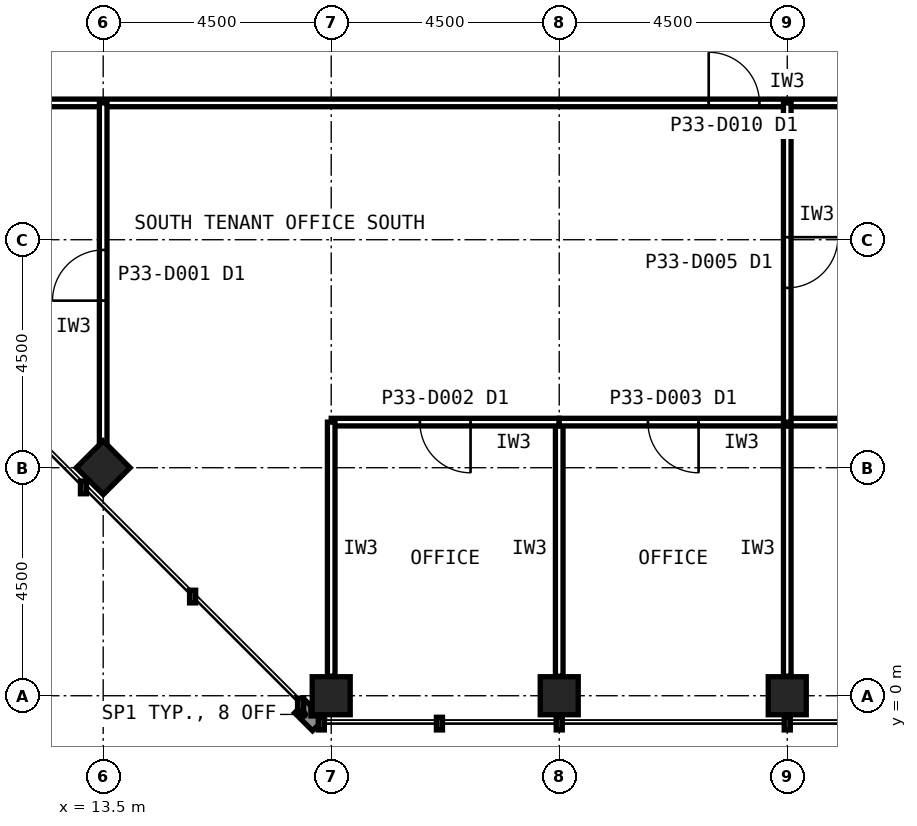
"""IFC4 building model, lengths in metres.
Left out: names, types, materials, properties, quantities, classifications, styles, units other than length and angle.
Written with IfcOpenShell. Run it as: python <this file> out.ifc"""

import sys

from ifc_helpers import new_model, si_unit, direction, frame, frame_2d, origin, origin_2d, place, context, subcontext, project, spatial, rectangle, hollow_rectangle, extrude, element, fill, save


model = new_model("IFC4")
c1 = context("Model", 3, precision=1e-05, world=origin(), true_north=direction((0.0, 1.0)))
c2 = subcontext(c1, "Body", "Model", "MODEL_VIEW")
j1 = project(units=[si_unit("LENGTHUNIT", "METRE"), si_unit("PLANEANGLEUNIT", "RADIAN")], contexts=[c1])
p1 = place(None, origin())
s1 = spatial("IfcSite", under=j1, at=p1, CompositionType="ELEMENT")
p2 = place(p1, origin())
s2 = spatial("IfcBuilding", under=s1, at=p2, CompositionType="ELEMENT")
p3 = place(p2, frame((0.0, 0.0, 143.6)))
s3 = spatial("IfcBuildingStorey", under=s2, at=p3, CompositionType="ELEMENT", Elevation=143.6)
for number, where, z_axis, x_axis in (
    (1, (18.0, 0.0, 0.0), (0.0, 0.0, 1.0), (1.0, 0.0, 0.0)),
    (2, (22.5, 0.0, 0.0), (0.0, 0.0, 1.0), (1.0, 0.0, 0.0)),
    (3, (27.0, 0.0, 0.0), (0.0, 0.0, 1.0), (1.0, 0.0, 0.0)),
    (4, (13.5, 4.5, 0.0), (0.0, 0.0, 1.0), (0.707, 0.707, 0.0)),
):
    element("IfcColumn", number, at=place(p3, frame(where, z_axis=z_axis, x_axis=x_axis)), inside=s3, PredefinedType="COLUMN", context=c2, shape_type="SweptSolid", body=[
        extrude(hollow_rectangle(XDim=0.75, YDim=0.75, WallThickness=0.04, at=origin_2d()), origin(), (0.0, 0.0, 1.0), 4.0),
    ])
p4 = place(p3, frame((11.7, 11.7, 0.0), z_axis=(0.0, 0.0, 1.0), x_axis=(1.0, 0.0, 0.0)))
e5 = element("IfcWall", 5, at=p4, inside=s3, PredefinedType="PARTITIONING", context=c2, shape_type="SweptSolid", body=[
    extrude(rectangle(XDim=30.6, YDim=0.15, at=frame_2d((15.3, 0.0))), origin(), (0.0, 0.0, 1.0), 3.84),
])
p5 = place(p4, frame((13.75, 0.0, 0.0)))
e6 = element("IfcOpeningElement", 6, at=p5, cuts=e5, PredefinedType="OPENING", context=c2, shape_type="SweptSolid", body=[
    extrude(rectangle(XDim=1.0, YDim=2.1, at=frame_2d((0.5, 1.05))), frame((0.0, 0.085, 0.0), z_axis=(0.0, -1.0, 0.0), x_axis=(1.0, 0.0, 0.0)), (0.0, 0.0, 1.0), 0.17),
])
p6 = place(p3, frame((22.5, 0.385, 0.0), z_axis=(0.0, 0.0, 1.0), x_axis=(0.0, 1.0, 0.0)))
e7 = element("IfcWall", 7, at=p6, inside=s3, PredefinedType="PARTITIONING", context=c2, shape_type="SweptSolid", body=[
    extrude(rectangle(XDim=5.015, YDim=0.15, at=frame_2d((2.507, 0.0))), origin(), (0.0, 0.0, 1.0), 2.989),
])
p7 = place(p3, frame((22.5, 5.4, 0.0), z_axis=(0.0, 0.0, 1.0), x_axis=(-1.0, 0.0, 0.0)))
e8 = element("IfcWall", 8, at=p7, inside=s3, PredefinedType="PARTITIONING", context=c2, shape_type="SweptSolid", body=[
    extrude(rectangle(XDim=4.5, YDim=0.15, at=frame_2d((2.25, 0.0))), origin(), (0.0, 0.0, 1.0), 3.84),
])
p8 = place(p7, frame((1.75, 0.0, 0.0)))
e9 = element("IfcOpeningElement", 9, at=p8, cuts=e8, PredefinedType="OPENING", context=c2, shape_type="SweptSolid", body=[
    extrude(rectangle(XDim=1.0, YDim=2.1, at=frame_2d((0.5, 1.05))), frame((0.0, 0.085, 0.0), z_axis=(0.0, -1.0, 0.0), x_axis=(1.0, 0.0, 0.0)), (0.0, 0.0, 1.0), 0.17),
])
for number, where, z_axis, x_axis in (
    (10, (18.0, 5.4, 0.0), (0.0, 0.0, 1.0), (0.0, -1.0, 0.0)),
    (11, (27.0, 0.385, 0.0), (0.0, 0.0, 1.0), (0.0, 1.0, 0.0)),
):
    element("IfcWall", number, at=place(p3, frame(where, z_axis=z_axis, x_axis=x_axis)), inside=s3, PredefinedType="PARTITIONING", context=c2, shape_type="SweptSolid", body=[
        extrude(rectangle(XDim=5.015, YDim=0.15, at=frame_2d((2.507, 0.0))), origin(), (0.0, 0.0, 1.0), 2.989),
    ])
p9 = place(p3, frame((27.0, 5.4, 0.0), z_axis=(0.0, 0.0, 1.0), x_axis=(-1.0, 0.0, 0.0)))
e12 = element("IfcWall", 12, at=p9, inside=s3, PredefinedType="PARTITIONING", context=c2, shape_type="SweptSolid", body=[
    extrude(rectangle(XDim=4.5, YDim=0.15, at=frame_2d((2.25, 0.0))), origin(), (0.0, 0.0, 1.0), 3.84),
])
p10 = place(p9, frame((1.75, 0.0, 0.0)))
e13 = element("IfcOpeningElement", 13, at=p10, cuts=e12, PredefinedType="OPENING", context=c2, shape_type="SweptSolid", body=[
    extrude(rectangle(XDim=1.0, YDim=2.1, at=frame_2d((0.5, 1.05))), frame((0.0, 0.085, 0.0), z_axis=(0.0, -1.0, 0.0), x_axis=(1.0, 0.0, 0.0)), (0.0, 0.0, 1.0), 0.17),
])
p11 = place(p3, frame((31.5, 5.4, 0.0), z_axis=(0.0, 0.0, 1.0), x_axis=(-1.0, 0.0, 0.0)))
e14 = element("IfcWall", 14, at=p11, inside=s3, PredefinedType="PARTITIONING", context=c2, shape_type="SweptSolid", body=[
    extrude(rectangle(XDim=4.5, YDim=0.15, at=frame_2d((2.25, 0.0))), origin(), (0.0, 0.0, 1.0), 3.84),
])
p12 = place(p11, frame((1.75, 0.0, 0.0)))
e15 = element("IfcOpeningElement", 15, at=p12, cuts=e14, PredefinedType="OPENING", context=c2, shape_type="SweptSolid", body=[
    extrude(rectangle(XDim=1.0, YDim=2.1, at=frame_2d((0.5, 1.05))), frame((0.0, 0.085, 0.0), z_axis=(0.0, -1.0, 0.0), x_axis=(1.0, 0.0, 0.0)), (0.0, 0.0, 1.0), 0.17),
])
p13 = place(p3, frame((13.5, 4.895, 0.0), z_axis=(0.0, 0.0, 1.0), x_axis=(0.0, 1.0, 0.0)))
e16 = element("IfcWall", 16, at=p13, inside=s3, PredefinedType="PARTITIONING", context=c2, shape_type="SweptSolid", body=[
    extrude(rectangle(XDim=6.805, YDim=0.15, at=frame_2d((3.402, 0.0))), origin(), (0.0, 0.0, 1.0), 2.989),
])
p14 = place(p13, frame((2.903, 0.0, 0.0)))
e17 = element("IfcOpeningElement", 17, at=p14, cuts=e16, PredefinedType="OPENING", context=c2, shape_type="SweptSolid", body=[
    extrude(rectangle(XDim=1.0, YDim=2.1, at=frame_2d((0.5, 1.05))), frame((0.0, 0.085, 0.0), z_axis=(0.0, -1.0, 0.0), x_axis=(1.0, 0.0, 0.0)), (0.0, 0.0, 1.0), 0.17),
])
p15 = place(p3, frame((27.0, 11.7, 0.0), z_axis=(0.0, 0.0, 1.0), x_axis=(0.0, -1.0, 0.0)))
e18 = element("IfcWall", 18, at=p15, inside=s3, PredefinedType="PARTITIONING", context=c2, shape_type="SweptSolid", body=[
    extrude(rectangle(XDim=6.3, YDim=0.15, at=frame_2d((3.15, 0.0))), origin(), (0.0, 0.0, 1.0), 2.989),
])
p16 = place(p15, frame((2.65, 0.0, 0.0)))
e19 = element("IfcOpeningElement", 19, at=p16, cuts=e18, PredefinedType="OPENING", context=c2, shape_type="SweptSolid", body=[
    extrude(rectangle(XDim=1.0, YDim=2.1, at=frame_2d((0.5, 1.05))), frame((0.0, 0.085, 0.0), z_axis=(0.0, -1.0, 0.0), x_axis=(1.0, 0.0, 0.0)), (0.0, 0.0, 1.0), 0.17),
])
p17 = place(p5, origin())
e20 = element("IfcDoor", 20, at=p17, inside=s3, OperationType="SINGLE_SWING_LEFT", PredefinedType="DOOR", context=c2, shape_type="SweptSolid", body=[
    extrude(rectangle(XDim=1.0, YDim=2.1, at=frame_2d((0.5, 1.05))), frame((0.0, 0.025, 0.0), z_axis=(0.0, -1.0, 0.0), x_axis=(1.0, 0.0, 0.0)), (0.0, 0.0, 1.0), 0.05),
])
fill(e6, e20)
p18 = place(p8, origin())
e21 = element("IfcDoor", 21, at=p18, inside=s3, OperationType="SINGLE_SWING_LEFT", PredefinedType="DOOR", context=c2, shape_type="SweptSolid", body=[
    extrude(rectangle(XDim=1.0, YDim=2.1, at=frame_2d((0.5, 1.05))), frame((0.0, 0.025, 0.0), z_axis=(0.0, -1.0, 0.0), x_axis=(1.0, 0.0, 0.0)), (0.0, 0.0, 1.0), 0.05),
])
fill(e9, e21)
p19 = place(p10, origin())
e22 = element("IfcDoor", 22, at=p19, inside=s3, OperationType="SINGLE_SWING_LEFT", PredefinedType="DOOR", context=c2, shape_type="SweptSolid", body=[
    extrude(rectangle(XDim=1.0, YDim=2.1, at=frame_2d((0.5, 1.05))), frame((0.0, 0.025, 0.0), z_axis=(0.0, -1.0, 0.0), x_axis=(1.0, 0.0, 0.0)), (0.0, 0.0, 1.0), 0.05),
])
fill(e13, e22)
p20 = place(p14, origin())
e23 = element("IfcDoor", 23, at=p20, inside=s3, OperationType="SINGLE_SWING_LEFT", PredefinedType="DOOR", context=c2, shape_type="SweptSolid", body=[
    extrude(rectangle(XDim=1.0, YDim=2.1, at=frame_2d((0.5, 1.05))), frame((0.0, 0.025, 0.0), z_axis=(0.0, -1.0, 0.0), x_axis=(1.0, 0.0, 0.0)), (0.0, 0.0, 1.0), 0.05),
])
fill(e17, e23)
p21 = place(p16, origin())
e24 = element("IfcDoor", 24, at=p21, inside=s3, OperationType="SINGLE_SWING_LEFT", PredefinedType="DOOR", context=c2, shape_type="SweptSolid", body=[
    extrude(rectangle(XDim=1.0, YDim=2.1, at=frame_2d((0.5, 1.05))), frame((0.0, 0.025, 0.0), z_axis=(0.0, -1.0, 0.0), x_axis=(1.0, 0.0, 0.0)), (0.0, 0.0, 1.0), 0.05),
])
fill(e19, e24)
save(model, sys.argv[1])
